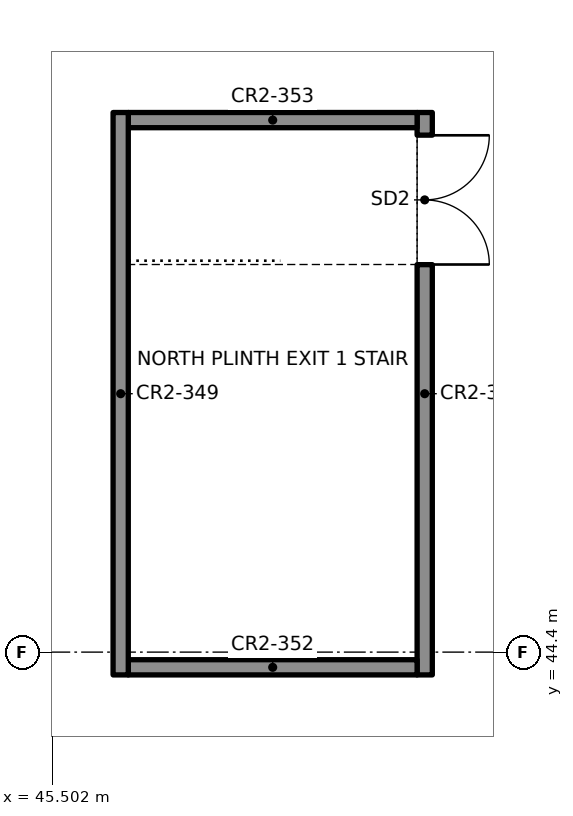
"""IFC4 building model, lengths in metres.
Left out: names, types, materials, properties, quantities, classifications, styles, units other than length and angle.
Written with IfcOpenShell. Run it as: python <this file> out.ifc"""

import sys

from ifc_helpers import new_model, si_unit, direction, frame, frame_2d, origin, place, context, subcontext, project, spatial, rectangle, extrude, element, fill, save


model = new_model("IFC4")
c1 = context("Model", 3, precision=1e-05, world=origin(), true_north=direction((0.0, 1.0)))
c2 = subcontext(c1, "Body", "Model", "MODEL_VIEW")
j1 = project(units=[si_unit("LENGTHUNIT", "METRE"), si_unit("PLANEANGLEUNIT", "RADIAN")], contexts=[c1])
p1 = place(None, origin())
s1 = spatial("IfcSite", under=j1, at=p1, CompositionType="ELEMENT")
p2 = place(p1, origin())
s2 = spatial("IfcBuilding", under=s1, at=p2, CompositionType="ELEMENT")
p3 = place(p2, frame((0.0, 0.0, 4.4)))
s3 = spatial("IfcBuildingStorey", under=s2, at=p3, CompositionType="ELEMENT", Elevation=4.4)
p4 = place(p3, frame((46.4, 44.1, 0.0), z_axis=(0.0, 0.0, 1.0), x_axis=(0.0, 1.0, 0.0)))
e1 = element("IfcWall", 1, at=p4, inside=s3, PredefinedType="SOLIDWALL", context=c2, shape_type="SweptSolid", body=[
    extrude(rectangle(XDim=7.4, YDim=0.2, at=frame_2d((3.7, 0.0))), origin(), (0.0, 0.0, 1.0), 3.0),
])
p5 = place(p3, frame((50.4, 44.1, 0.0), z_axis=(0.0, 0.0, 1.0), x_axis=(0.0, 1.0, 0.0)))
e2 = element("IfcWall", 2, at=p5, inside=s3, PredefinedType="SOLIDWALL", context=c2, shape_type="SweptSolid", body=[
    extrude(rectangle(XDim=7.4, YDim=0.2, at=frame_2d((3.7, 0.0))), origin(), (0.0, 0.0, 1.0), 3.0),
])
p6 = place(p5, frame((5.4, 0.0, 0.0)))
e3 = element("IfcOpeningElement", 3, at=p6, cuts=e2, PredefinedType="OPENING", context=c2, shape_type="SweptSolid", body=[
    extrude(rectangle(XDim=1.7, YDim=2.1, at=frame_2d((0.85, 1.05))), frame((0.0, 0.11, 0.0), z_axis=(0.0, -1.0, 0.0), x_axis=(1.0, 0.0, 0.0)), (0.0, 0.0, 1.0), 0.22),
])
for number, where, z_axis, x_axis in (
    (4, (46.5, 44.2, 0.0), (0.0, 0.0, 1.0), (1.0, 0.0, 0.0)),
    (5, (46.5, 51.4, 0.0), (0.0, 0.0, 1.0), (1.0, 0.0, 0.0)),
):
    element("IfcWall", number, at=place(p3, frame(where, z_axis=z_axis, x_axis=x_axis)), inside=s3, PredefinedType="SOLIDWALL", context=c2, shape_type="SweptSolid", body=[
        extrude(rectangle(XDim=3.8, YDim=0.2, at=frame_2d((1.9, 0.0))), origin(), (0.0, 0.0, 1.0), 3.0),
    ])
p7 = place(p6, origin())
e6 = element("IfcDoor", 6, at=p7, inside=s3, OperationType="DOUBLE_DOOR_SINGLE_SWING", PredefinedType="DOOR", context=c2, shape_type="SweptSolid", body=[
    extrude(rectangle(XDim=1.7, YDim=2.1, at=frame_2d((0.85, 1.05))), frame((0.0, 0.025, 0.0), z_axis=(0.0, -1.0, 0.0), x_axis=(1.0, 0.0, 0.0)), (0.0, 0.0, 1.0), 0.05),
])
fill(e3, e6)
save(model, sys.argv[1])
